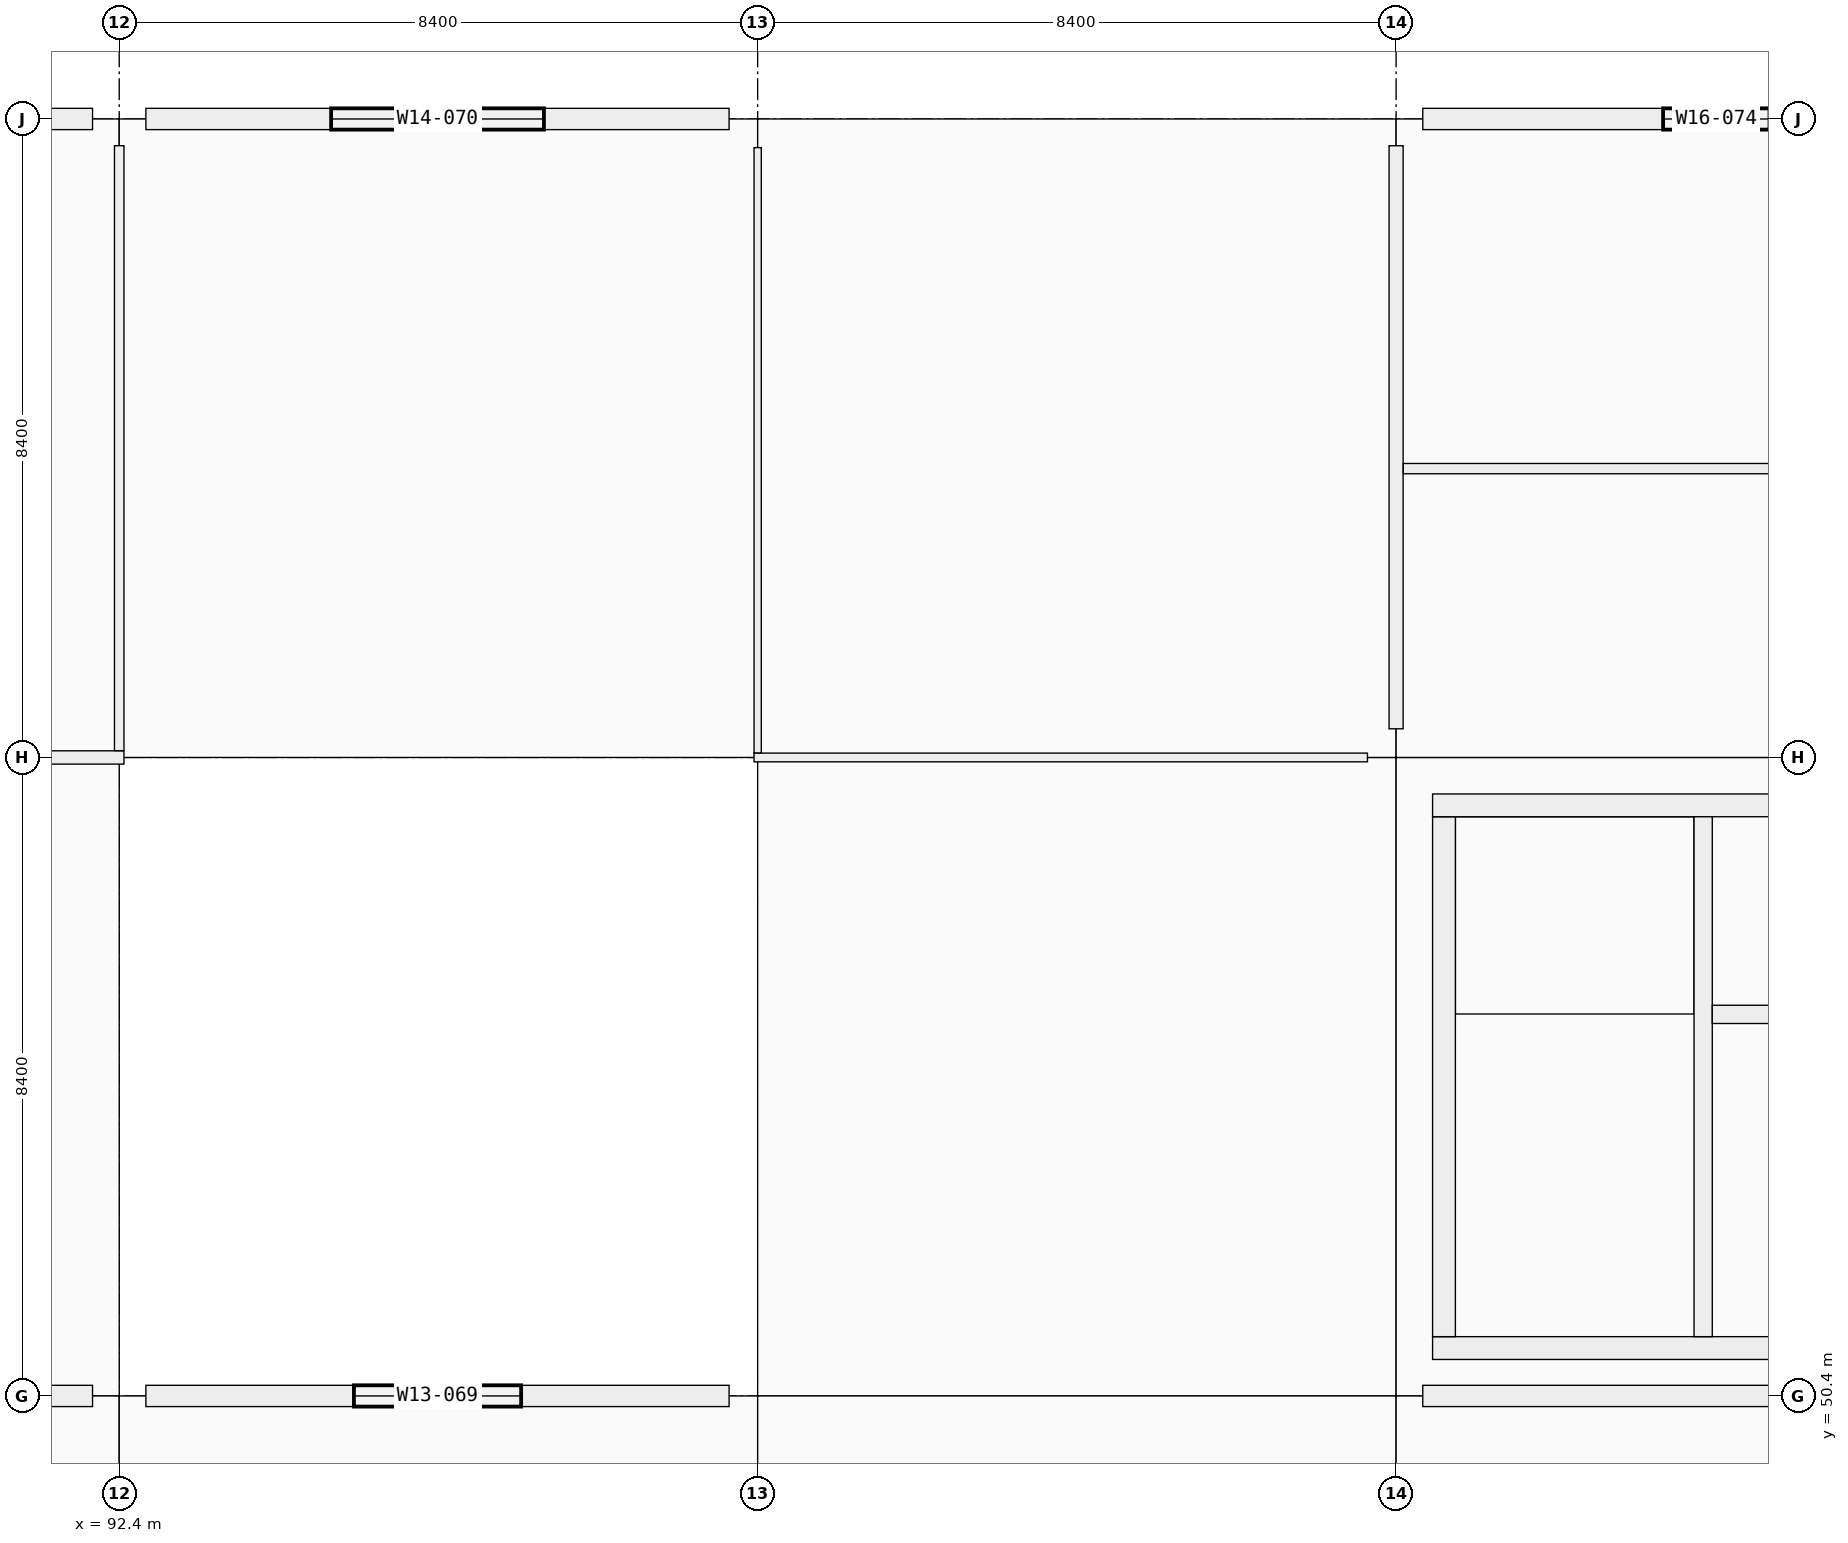
"""IFC4 building model, lengths in metres.
Left out: names, types, materials, properties, quantities, classifications, styles, units other than length and angle.
Written with IfcOpenShell. Run it as: python <this file> out.ifc"""

import sys

from ifc_helpers import new_model, si_unit, direction, frame, frame_2d, origin, origin_2d, place, context, subcontext, project, spatial, rectangle, extrude, element, fill, save


model = new_model("IFC4")
c1 = context("Model", 3, precision=1e-05, world=origin(), true_north=direction((0.0, 1.0)))
c2 = subcontext(c1, "Body", "Model", "MODEL_VIEW")
j1 = project(units=[si_unit("LENGTHUNIT", "METRE"), si_unit("PLANEANGLEUNIT", "RADIAN")], contexts=[c1])
p1 = place(None, origin())
s1 = spatial("IfcSite", under=j1, at=p1, CompositionType="ELEMENT")
p2 = place(p1, origin())
s2 = spatial("IfcBuilding", under=s1, at=p2, CompositionType="ELEMENT")
p3 = place(p2, frame((0.0, 0.0, 5.76)))
s3 = spatial("IfcBuildingStorey", under=s2, at=p3, CompositionType="ELEMENT", Elevation=5.76)
for number, where, z_axis, x_axis in (
    (1, (92.4, 50.4, 0.0), (0.0, 0.0, 1.0), (1.0, 0.0, 0.0)),
    (2, (92.4, 67.2, 0.0), (0.0, 0.0, 1.0), (1.0, 0.0, 0.0)),
):
    element("IfcColumn", number, at=place(p3, frame(where, z_axis=z_axis, x_axis=x_axis)), inside=s3, PredefinedType="COLUMN", context=c2, shape_type="SweptSolid", body=[
        extrude(rectangle(XDim=0.7, YDim=0.7, at=origin_2d()), origin(), (0.0, 0.0, 1.0), 4.5),
    ])
for number, where, z_axis, x_axis in (
    (3, (100.8, 50.4, 0.0), (0.0, 0.0, 1.0), (1.0, 0.0, 0.0)),
    (4, (100.8, 67.2, 0.0), (0.0, 0.0, 1.0), (1.0, 0.0, 0.0)),
):
    element("IfcColumn", number, at=place(p3, frame(where, z_axis=z_axis, x_axis=x_axis)), inside=s3, PredefinedType="COLUMN", context=c2, shape_type="SweptSolid", body=[
        extrude(rectangle(XDim=0.75, YDim=0.75, at=origin_2d()), origin(), (0.0, 0.0, 1.0), 4.5),
    ])
p4 = place(p3, frame((109.2, 50.4, 0.0), z_axis=(0.0, 0.0, 1.0), x_axis=(1.0, 0.0, 0.0)))
e5 = element("IfcColumn", 5, at=p4, inside=s3, PredefinedType="COLUMN", context=c2, shape_type="SweptSolid", body=[
    extrude(rectangle(XDim=0.7, YDim=0.7, at=origin_2d()), origin(), (0.0, 0.0, 1.0), 4.5),
])
p5 = place(p3, frame((109.2, 58.8, 0.0), z_axis=(0.0, 0.0, 1.0), x_axis=(1.0, 0.0, 0.0)))
e6 = element("IfcColumn", 6, at=p5, inside=s3, PredefinedType="COLUMN", context=c2, shape_type="SweptSolid", body=[
    extrude(rectangle(XDim=0.75, YDim=0.75, at=origin_2d()), origin(), (0.0, 0.0, 1.0), 4.5),
])
p6 = place(p3, frame((109.2, 67.2, 0.0), z_axis=(0.0, 0.0, 1.0), x_axis=(1.0, 0.0, 0.0)))
e7 = element("IfcColumn", 7, at=p6, inside=s3, PredefinedType="COLUMN", context=c2, shape_type="SweptSolid", body=[
    extrude(rectangle(XDim=0.7, YDim=0.7, at=origin_2d()), origin(), (0.0, 0.0, 1.0), 4.5),
])
p7 = place(p3, frame((92.049, 50.4, 0.0), z_axis=(0.0, 0.0, 1.0), x_axis=(-1.0, 0.0, 0.0)))
e8 = element("IfcWall", 8, at=p7, inside=s3, PredefinedType="SOLIDWALL", context=c2, shape_type="SweptSolid", body=[
    extrude(rectangle(XDim=7.673, YDim=0.28, at=frame_2d((3.836, 0.0))), origin(), (0.0, 0.0, 1.0), 3.4),
])
p8 = place(p7, frame((2.537, 0.0, 0.9)))
e9 = element("IfcOpeningElement", 9, at=p8, cuts=e8, PredefinedType="OPENING", context=c2, shape_type="SweptSolid", body=[
    extrude(rectangle(XDim=2.6, YDim=2.1, at=frame_2d((1.3, 1.05))), frame((0.0, 0.14, 0.0), z_axis=(0.0, -1.0, 0.0), x_axis=(1.0, 0.0, 0.0)), (0.0, 0.0, 1.0), 0.28),
])
p9 = place(p3, frame((84.376, 67.2, 0.0), z_axis=(0.0, 0.0, 1.0), x_axis=(1.0, 0.0, 0.0)))
e10 = element("IfcWall", 10, at=p9, inside=s3, PredefinedType="SOLIDWALL", context=c2, shape_type="SweptSolid", body=[
    extrude(rectangle(XDim=7.673, YDim=0.28, at=frame_2d((3.836, 0.0))), origin(), (0.0, 0.0, 1.0), 3.4),
])
p10 = place(p9, frame((3.236, 0.0, 0.9)))
e11 = element("IfcOpeningElement", 11, at=p10, cuts=e10, PredefinedType="OPENING", context=c2, shape_type="SweptSolid", body=[
    extrude(rectangle(XDim=1.2, YDim=2.1, at=frame_2d((0.6, 1.05))), frame((0.0, 0.14, 0.0), z_axis=(0.0, -1.0, 0.0), x_axis=(1.0, 0.0, 0.0)), (0.0, 0.0, 1.0), 0.28),
])
p11 = place(p3, frame((100.424, 50.4, 0.0), z_axis=(0.0, 0.0, 1.0), x_axis=(-1.0, 0.0, 0.0)))
e12 = element("IfcWall", 12, at=p11, inside=s3, PredefinedType="SOLIDWALL", context=c2, shape_type="SweptSolid", body=[
    extrude(rectangle(XDim=7.673, YDim=0.28, at=frame_2d((3.836, 0.0))), origin(), (0.0, 0.0, 1.0), 3.4),
])
p12 = place(p11, frame((2.736, 0.0, 0.9)))
e13 = element("IfcOpeningElement", 13, at=p12, cuts=e12, PredefinedType="OPENING", context=c2, shape_type="SweptSolid", body=[
    extrude(rectangle(XDim=2.2, YDim=1.75, at=frame_2d((1.1, 0.875))), frame((0.0, 0.14, 0.0), z_axis=(0.0, -1.0, 0.0), x_axis=(1.0, 0.0, 0.0)), (0.0, 0.0, 1.0), 0.28),
])
p13 = place(p3, frame((92.751, 67.2, 0.0), z_axis=(0.0, 0.0, 1.0), x_axis=(1.0, 0.0, 0.0)))
e14 = element("IfcWall", 14, at=p13, inside=s3, PredefinedType="SOLIDWALL", context=c2, shape_type="SweptSolid", body=[
    extrude(rectangle(XDim=7.673, YDim=0.28, at=frame_2d((3.836, 0.0))), origin(), (0.0, 0.0, 1.0), 3.4),
])
p14 = place(p13, frame((2.437, 0.0, 0.9)))
e15 = element("IfcOpeningElement", 15, at=p14, cuts=e14, PredefinedType="OPENING", context=c2, shape_type="SweptSolid", body=[
    extrude(rectangle(XDim=2.8, YDim=1.75, at=frame_2d((1.4, 0.875))), frame((0.0, 0.14, 0.0), z_axis=(0.0, -1.0, 0.0), x_axis=(1.0, 0.0, 0.0)), (0.0, 0.0, 1.0), 0.28),
])
p15 = place(p3, frame((117.224, 50.4, 0.0), z_axis=(0.0, 0.0, 1.0), x_axis=(-1.0, 0.0, 0.0)))
e16 = element("IfcWall", 16, at=p15, inside=s3, PredefinedType="SOLIDWALL", context=c2, shape_type="SweptSolid", body=[
    extrude(rectangle(XDim=7.673, YDim=0.28, at=frame_2d((3.836, 0.0))), origin(), (0.0, 0.0, 1.0), 3.4),
])
p16 = place(p3, frame((109.551, 67.2, 0.0), z_axis=(0.0, 0.0, 1.0), x_axis=(1.0, 0.0, 0.0)))
e17 = element("IfcWall", 17, at=p16, inside=s3, PredefinedType="SOLIDWALL", context=c2, shape_type="SweptSolid", body=[
    extrude(rectangle(XDim=7.723, YDim=0.28, at=frame_2d((3.861, 0.0))), origin(), (0.0, 0.0, 1.0), 3.4),
])
p17 = place(p16, frame((3.162, 0.0, 0.9)))
e18 = element("IfcOpeningElement", 18, at=p17, cuts=e17, PredefinedType="OPENING", context=c2, shape_type="SweptSolid", body=[
    extrude(rectangle(XDim=1.4, YDim=1.75, at=frame_2d((0.7, 0.875))), frame((0.0, 0.14, 0.0), z_axis=(0.0, -1.0, 0.0), x_axis=(1.0, 0.0, 0.0)), (0.0, 0.0, 1.0), 0.28),
])
p18 = place(p3, frame((117.12, 51.03, 0.0), z_axis=(0.0, 0.0, 1.0), x_axis=(-1.0, 0.0, 0.0)))
e19 = element("IfcWall", 19, at=p18, inside=s3, PredefinedType="SHEAR", context=c2, shape_type="SweptSolid", body=[
    extrude(rectangle(XDim=7.44, YDim=0.3, at=frame_2d((3.72, 0.0))), origin(), (0.0, 0.0, 1.0), 4.5),
])
p19 = place(p3, frame((109.83, 51.18, 0.0), z_axis=(0.0, 0.0, 1.0), x_axis=(0.0, 1.0, 0.0)))
e20 = element("IfcWall", 20, at=p19, inside=s3, PredefinedType="SHEAR", context=c2, shape_type="SweptSolid", body=[
    extrude(rectangle(XDim=6.84, YDim=0.3, at=frame_2d((3.42, 0.0))), origin(), (0.0, 0.0, 1.0), 4.5),
])
p20 = place(p3, frame((109.68, 58.17, 0.0), z_axis=(0.0, 0.0, 1.0), x_axis=(1.0, 0.0, 0.0)))
e21 = element("IfcWall", 21, at=p20, inside=s3, PredefinedType="SHEAR", context=c2, shape_type="SweptSolid", body=[
    extrude(rectangle(XDim=7.44, YDim=0.3, at=frame_2d((3.72, 0.0))), origin(), (0.0, 0.0, 1.0), 4.5),
])
p21 = place(p3, frame((113.24, 51.18, 0.0), z_axis=(0.0, 0.0, 1.0), x_axis=(0.0, 1.0, 0.0)))
e22 = element("IfcWall", 22, at=p21, inside=s3, PredefinedType="SHEAR", context=c2, shape_type="SweptSolid", body=[
    extrude(rectangle(XDim=6.84, YDim=0.24, at=frame_2d((3.42, 0.0))), origin(), (0.0, 0.0, 1.0), 4.5),
])
p22 = place(p21, frame((0.12, 0.0, 0.0)))
e23 = element("IfcOpeningElement", 23, at=p22, cuts=e22, PredefinedType="OPENING", context=c2, shape_type="SweptSolid", body=[
    extrude(rectangle(XDim=1.0, YDim=2.15, at=frame_2d((0.5, 1.075))), frame((0.0, 0.12, 0.0), z_axis=(0.0, -1.0, 0.0), x_axis=(1.0, 0.0, 0.0)), (0.0, 0.0, 1.0), 0.24),
])
p23 = place(p3, frame((113.36, 55.42, 0.0), z_axis=(0.0, 0.0, 1.0), x_axis=(1.0, 0.0, 0.0)))
e24 = element("IfcWall", 24, at=p23, inside=s3, PredefinedType="SHEAR", context=c2, shape_type="SweptSolid", body=[
    extrude(rectangle(XDim=3.46, YDim=0.24, at=frame_2d((1.73, 0.0))), origin(), (0.0, 0.0, 1.0), 4.5),
])
p24 = place(p23, frame((1.18, 0.0, 0.0)))
e25 = element("IfcOpeningElement", 25, at=p24, cuts=e24, PredefinedType="OPENING", context=c2, shape_type="SweptSolid", body=[
    extrude(rectangle(XDim=1.1, YDim=2.15, at=frame_2d((0.55, 1.075))), frame((0.0, 0.12, 0.0), z_axis=(0.0, -1.0, 0.0), x_axis=(1.0, 0.0, 0.0)), (0.0, 0.0, 1.0), 0.24),
])
p25 = place(p3, frame((84.0, 58.8, 0.0), z_axis=(0.0, 0.0, 1.0), x_axis=(1.0, 0.0, 0.0)))
e26 = element("IfcWall", 26, at=p25, inside=s3, PredefinedType="PARTITIONING", context=c2, shape_type="SweptSolid", body=[
    extrude(rectangle(XDim=8.462, YDim=0.175, at=frame_2d((4.231, 0.0))), origin(), (0.0, 0.0, 1.0), 2.4),
])
p26 = place(p25, frame((3.556, 0.0, 0.0)))
e27 = element("IfcOpeningElement", 27, at=p26, cuts=e26, PredefinedType="OPENING", context=c2, shape_type="SweptSolid", body=[
    extrude(rectangle(XDim=1.35, YDim=2.2, at=frame_2d((0.675, 1.1))), frame((0.0, 0.087, 0.0), z_axis=(0.0, -1.0, 0.0), x_axis=(1.0, 0.0, 0.0)), (0.0, 0.0, 1.0), 0.175),
])
p27 = place(p3, frame((100.752, 58.8, 0.0), z_axis=(0.0, 0.0, 1.0), x_axis=(1.0, 0.0, 0.0)))
e28 = element("IfcWall", 28, at=p27, inside=s3, PredefinedType="PARTITIONING", context=c2, shape_type="SweptSolid", body=[
    extrude(rectangle(XDim=8.071, YDim=0.115, at=frame_2d((4.035, 0.0))), origin(), (0.0, 0.0, 1.0), 2.4),
])
p28 = place(p27, frame((3.185, 0.0, 0.0)))
e29 = element("IfcOpeningElement", 29, at=p28, cuts=e28, PredefinedType="OPENING", context=c2, shape_type="SweptSolid", body=[
    extrude(rectangle(XDim=1.7, YDim=2.22, at=frame_2d((0.85, 1.11))), frame((0.0, 0.058, 0.0), z_axis=(0.0, -1.0, 0.0), x_axis=(1.0, 0.0, 0.0)), (0.0, 0.0, 1.0), 0.115),
])
p29 = place(p3, frame((92.4, 58.889, 0.0), z_axis=(0.0, 0.0, 1.0), x_axis=(0.0, 1.0, 0.0)))
e30 = element("IfcWall", 30, at=p29, inside=s3, PredefinedType="PARTITIONING", context=c2, shape_type="SweptSolid", body=[
    extrude(rectangle(XDim=7.958, YDim=0.125, at=frame_2d((3.979, 0.0))), origin(), (0.0, 0.0, 1.0), 2.4),
])
p30 = place(p29, frame((3.279, 0.0, 0.0)))
e31 = element("IfcOpeningElement", 31, at=p30, cuts=e30, PredefinedType="OPENING", context=c2, shape_type="SweptSolid", body=[
    extrude(rectangle(XDim=1.4, YDim=2.22, at=frame_2d((0.7, 1.11))), frame((0.0, 0.062, 0.0), z_axis=(0.0, -1.0, 0.0), x_axis=(1.0, 0.0, 0.0)), (0.0, 0.0, 1.0), 0.125),
])
p31 = place(p3, frame((100.8, 58.86, 0.0), z_axis=(0.0, 0.0, 1.0), x_axis=(0.0, 1.0, 0.0)))
e32 = element("IfcWall", 32, at=p31, inside=s3, PredefinedType="PARTITIONING", context=c2, shape_type="SweptSolid", body=[
    extrude(rectangle(XDim=7.963, YDim=0.095, at=frame_2d((3.982, 0.0))), origin(), (0.0, 0.0, 1.0), 2.4),
])
p32 = place(p31, frame((3.497, 0.0, 0.0)))
e33 = element("IfcOpeningElement", 33, at=p32, cuts=e32, PredefinedType="OPENING", context=c2, shape_type="SweptSolid", body=[
    extrude(rectangle(XDim=0.97, YDim=2.12, at=frame_2d((0.485, 1.06))), frame((0.0, 0.047, 0.0), z_axis=(0.0, -1.0, 0.0), x_axis=(1.0, 0.0, 0.0)), (0.0, 0.0, 1.0), 0.095),
])
p33 = place(p3, frame((109.2, 59.177, 0.0), z_axis=(0.0, 0.0, 1.0), x_axis=(0.0, 1.0, 0.0)))
e34 = element("IfcWall", 34, at=p33, inside=s3, PredefinedType="PARTITIONING", context=c2, shape_type="SweptSolid", body=[
    extrude(rectangle(XDim=7.671, YDim=0.185, at=frame_2d((3.835, 0.0))), origin(), (0.0, 0.0, 1.0), 2.4),
])
p34 = place(p3, frame((109.294, 62.6, 0.0), z_axis=(0.0, 0.0, 1.0), x_axis=(1.0, 0.0, 0.0)))
e35 = element("IfcWall", 35, at=p34, inside=s3, PredefinedType="PARTITIONING", context=c2, shape_type="SweptSolid", body=[
    extrude(rectangle(XDim=8.226, YDim=0.135, at=frame_2d((4.113, 0.0))), origin(), (0.0, 0.0, 1.0), 2.4),
])
p35 = place(p12, origin())
e36 = element("IfcWindow", 36, at=p35, inside=s3, PartitioningType="SINGLE_PANEL", PredefinedType="WINDOW", context=c2, shape_type="SweptSolid", body=[
    extrude(rectangle(XDim=2.2, YDim=1.75, at=frame_2d((1.1, 0.875))), frame((0.0, 0.03, 0.0), z_axis=(0.0, -1.0, 0.0), x_axis=(1.0, 0.0, 0.0)), (0.0, 0.0, 1.0), 0.06),
])
fill(e13, e36)
p36 = place(p14, origin())
e37 = element("IfcWindow", 37, at=p36, inside=s3, PartitioningType="SINGLE_PANEL", PredefinedType="WINDOW", context=c2, shape_type="SweptSolid", body=[
    extrude(rectangle(XDim=2.8, YDim=1.75, at=frame_2d((1.4, 0.875))), frame((0.0, 0.03, 0.0), z_axis=(0.0, -1.0, 0.0), x_axis=(1.0, 0.0, 0.0)), (0.0, 0.0, 1.0), 0.06),
])
fill(e15, e37)
p37 = place(p17, origin())
e38 = element("IfcWindow", 38, at=p37, inside=s3, PartitioningType="SINGLE_PANEL", PredefinedType="WINDOW", context=c2, shape_type="SweptSolid", body=[
    extrude(rectangle(XDim=1.4, YDim=1.75, at=frame_2d((0.7, 0.875))), frame((0.0, 0.03, 0.0), z_axis=(0.0, -1.0, 0.0), x_axis=(1.0, 0.0, 0.0)), (0.0, 0.0, 1.0), 0.06),
])
fill(e18, e38)
p38 = place(p22, origin())
e39 = element("IfcDoor", 39, at=p38, inside=s3, OperationType="SINGLE_SWING_LEFT", PredefinedType="DOOR", context=c2, shape_type="SweptSolid", body=[
    extrude(rectangle(XDim=1.0, YDim=2.15, at=frame_2d((0.5, 1.075))), frame((0.0, 0.025, 0.0), z_axis=(0.0, -1.0, 0.0), x_axis=(1.0, 0.0, 0.0)), (0.0, 0.0, 1.0), 0.05),
])
fill(e23, e39)
p39 = place(p28, origin())
e40 = element("IfcDoor", 40, at=p39, inside=s3, OperationType="DOUBLE_DOOR_SINGLE_SWING", PredefinedType="DOOR", context=c2, shape_type="SweptSolid", body=[
    extrude(rectangle(XDim=1.7, YDim=2.22, at=frame_2d((0.85, 1.11))), frame((0.0, 0.025, 0.0), z_axis=(0.0, -1.0, 0.0), x_axis=(1.0, 0.0, 0.0)), (0.0, 0.0, 1.0), 0.05),
])
fill(e29, e40)
p40 = place(p30, origin())
e41 = element("IfcDoor", 41, at=p40, inside=s3, OperationType="DOUBLE_DOOR_SINGLE_SWING", PredefinedType="DOOR", context=c2, shape_type="SweptSolid", body=[
    extrude(rectangle(XDim=1.4, YDim=2.22, at=frame_2d((0.7, 1.11))), frame((0.0, 0.025, 0.0), z_axis=(0.0, -1.0, 0.0), x_axis=(1.0, 0.0, 0.0)), (0.0, 0.0, 1.0), 0.05),
])
fill(e31, e41)
p41 = place(p32, origin())
e42 = element("IfcDoor", 42, at=p41, inside=s3, OperationType="SINGLE_SWING_RIGHT", PredefinedType="DOOR", context=c2, shape_type="SweptSolid", body=[
    extrude(rectangle(XDim=0.97, YDim=2.12, at=frame_2d((0.485, 1.06))), frame((0.0, 0.025, 0.0), z_axis=(0.0, -1.0, 0.0), x_axis=(1.0, 0.0, 0.0)), (0.0, 0.0, 1.0), 0.05),
])
fill(e33, e42)
save(model, sys.argv[1])
